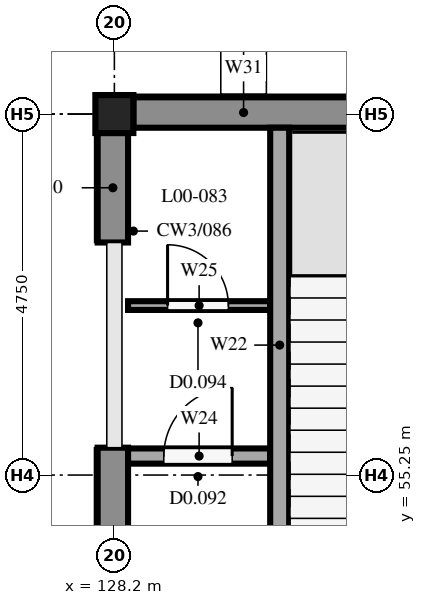
"""IFC4 building model, lengths in metres.
Left out: names, types, materials, properties, quantities, classifications, styles, units other than length and angle.
Written with IfcOpenShell. Run it as: python <this file> out.ifc"""

import sys

from ifc_helpers import new_model, si_unit, direction, frame, frame_2d, origin, origin_2d, place, context, subcontext, project, spatial, rectangle, extrude, element, fill, save


model = new_model("IFC4")
c1 = context("Model", 3, precision=1e-05, world=origin(), true_north=direction((0.0, 1.0)))
c2 = subcontext(c1, "Body", "Model", "MODEL_VIEW")
j1 = project(units=[si_unit("LENGTHUNIT", "METRE"), si_unit("PLANEANGLEUNIT", "RADIAN")], contexts=[c1])
p1 = place(None, origin())
s1 = spatial("IfcSite", under=j1, at=p1, CompositionType="ELEMENT")
p2 = place(p1, origin())
s2 = spatial("IfcBuilding", under=s1, at=p2, CompositionType="ELEMENT")
p3 = place(p2, origin())
s3 = spatial("IfcBuildingStorey", under=s2, at=p3, CompositionType="ELEMENT", Elevation=0.0)
p4 = place(p3, frame((128.2, 60.0, 0.0), z_axis=(0.0, 0.0, 1.0), x_axis=(1.0, 0.0, 0.0)))
e1 = element("IfcColumn", 1, at=p4, inside=s3, PredefinedType="COLUMN", context=c2, shape_type="SweptSolid", body=[
    extrude(rectangle(XDim=0.5, YDim=0.5, at=origin_2d()), origin(), (0.0, 0.0, 1.0), 4.25),
])
p5 = place(p3, frame((128.18, 51.25, 0.0), z_axis=(0.0, 0.0, 1.0), x_axis=(0.0, 1.0, 0.0)))
e2 = element("IfcWall", 2, at=p5, inside=s3, PredefinedType="STANDARD", context=c2, shape_type="SweptSolid", body=[
    extrude(rectangle(XDim=4.36, YDim=0.4, at=frame_2d((2.18, 0.0))), origin(), (0.0, 0.0, 1.0), 3.75),
])
p6 = place(p5, frame((0.45, 0.0, 0.0)))
e3 = element("IfcOpeningElement", 3, at=p6, cuts=e2, PredefinedType="OPENING", context=c2, shape_type="SweptSolid", body=[
    extrude(rectangle(XDim=2.0, YDim=2.2, at=frame_2d((1.0, 1.1))), frame((0.0, 0.21, 0.0), z_axis=(0.0, -1.0, 0.0), x_axis=(1.0, 0.0, 0.0)), (0.0, 0.0, 1.0), 0.42),
])
p7 = place(p3, frame((128.18, 58.31, 0.0), z_axis=(0.0, 0.0, 1.0), x_axis=(0.0, 1.0, 0.0)))
e4 = element("IfcWall", 4, at=p7, inside=s3, PredefinedType="STANDARD", context=c2, shape_type="SweptSolid", body=[
    extrude(rectangle(XDim=1.44, YDim=0.4, at=frame_2d((0.72, 0.0))), origin(), (0.0, 0.0, 1.0), 3.75),
])
p8 = place(p3, frame((128.45, 60.02, 0.0), z_axis=(0.0, 0.0, 1.0), x_axis=(1.0, 0.0, 0.0)))
e5 = element("IfcWall", 5, at=p8, inside=s3, PredefinedType="STANDARD", context=c2, shape_type="SweptSolid", body=[
    extrude(rectangle(XDim=2.9, YDim=0.4, at=frame_2d((1.45, 0.0))), origin(), (0.0, 0.0, 1.0), 3.8),
])
p9 = place(p3, frame((130.375, 54.1, 0.0), z_axis=(0.0, 0.0, 1.0), x_axis=(0.0, 1.0, 0.0)))
e6 = element("IfcWall", 6, at=p9, inside=s3, PredefinedType="SOLIDWALL", context=c2, shape_type="SweptSolid", body=[
    extrude(rectangle(XDim=5.72, YDim=0.25, at=frame_2d((2.86, 0.0))), origin(), (0.0, 0.0, 1.0), 4.25),
])
p10 = place(p3, frame((128.38, 55.5, 0.0), z_axis=(0.0, 0.0, 1.0), x_axis=(1.0, 0.0, 0.0)))
e7 = element("IfcWall", 7, at=p10, inside=s3, PredefinedType="SOLIDWALL", context=c2, shape_type="SweptSolid", body=[
    extrude(rectangle(XDim=1.87, YDim=0.2, at=frame_2d((0.935, 0.0))), origin(), (0.0, 0.0, 1.0), 4.25),
])
p11 = place(p10, frame((0.47, 0.0, 0.0)))
e8 = element("IfcOpeningElement", 8, at=p11, cuts=e7, PredefinedType="OPENING", context=c2, shape_type="SweptSolid", body=[
    extrude(rectangle(XDim=0.9, YDim=2.1, at=frame_2d((0.45, 1.05))), frame((0.0, 0.11, 0.0), z_axis=(0.0, -1.0, 0.0), x_axis=(1.0, 0.0, 0.0)), (0.0, 0.0, 1.0), 0.22),
])
p12 = place(p3, frame((128.38, 57.48, 0.0), z_axis=(0.0, 0.0, 1.0), x_axis=(1.0, 0.0, 0.0)))
e9 = element("IfcWall", 9, at=p12, inside=s3, PredefinedType="PARTITIONING", context=c2, shape_type="SweptSolid", body=[
    extrude(rectangle(XDim=1.87, YDim=0.115, at=frame_2d((0.935, 0.0))), origin(), (0.0, 0.0, 1.0), 4.25),
])
p13 = place(p12, frame((0.52, 0.0, 0.0)))
e10 = element("IfcOpeningElement", 10, at=p13, cuts=e9, PredefinedType="OPENING", context=c2, shape_type="SweptSolid", body=[
    extrude(rectangle(XDim=0.8, YDim=2.1, at=frame_2d((0.4, 1.05))), frame((0.0, 0.067, 0.0), z_axis=(0.0, -1.0, 0.0), x_axis=(1.0, 0.0, 0.0)), (0.0, 0.0, 1.0), 0.135),
])
p14 = place(p11, origin())
e11 = element("IfcDoor", 11, at=p14, inside=s3, OperationType="SINGLE_SWING_RIGHT", PredefinedType="DOOR", context=c2, shape_type="SweptSolid", body=[
    extrude(rectangle(XDim=0.9, YDim=2.1, at=frame_2d((0.45, 1.05))), frame((0.0, 0.025, 0.0), z_axis=(0.0, -1.0, 0.0), x_axis=(1.0, 0.0, 0.0)), (0.0, 0.0, 1.0), 0.05),
])
fill(e8, e11)
p15 = place(p13, origin())
e12 = element("IfcDoor", 12, at=p15, inside=s3, OperationType="SINGLE_SWING_LEFT", PredefinedType="DOOR", context=c2, shape_type="SweptSolid", body=[
    extrude(rectangle(XDim=0.8, YDim=2.1, at=frame_2d((0.4, 1.05))), frame((0.0, 0.025, 0.0), z_axis=(0.0, -1.0, 0.0), x_axis=(1.0, 0.0, 0.0)), (0.0, 0.0, 1.0), 0.05),
])
fill(e10, e12)
save(model, sys.argv[1])
